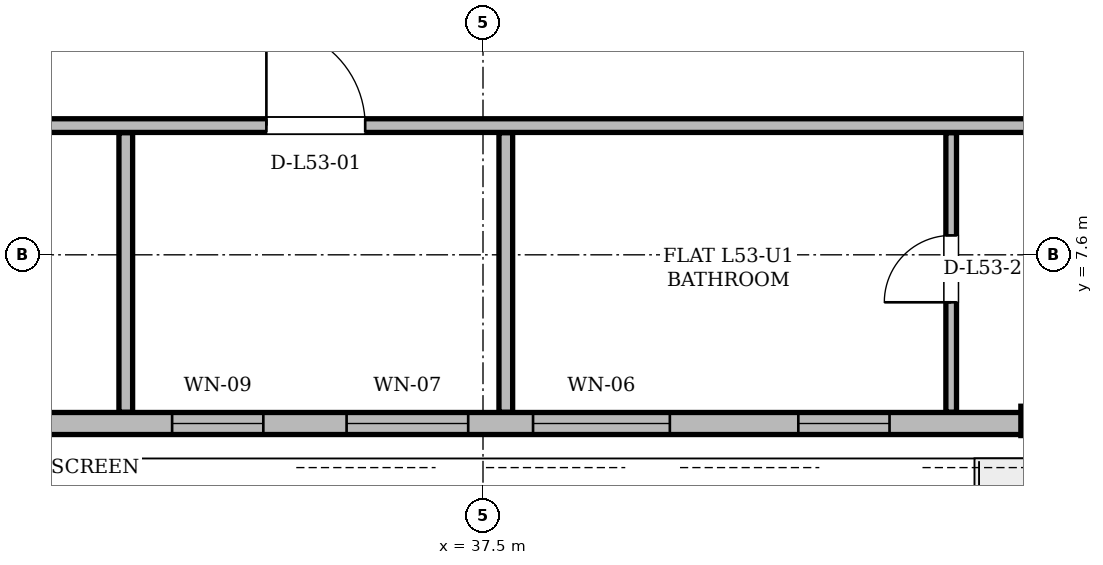
"""IFC4 building model, lengths in metres.
Left out: names, types, materials, properties, quantities, classifications, styles, units other than length and angle.
Written with IfcOpenShell. Run it as: python <this file> out.ifc"""

import sys

from ifc_helpers import new_model, si_unit, direction, frame, frame_2d, origin, origin_2d, place, context, subcontext, project, spatial, rectangle, i_section, extrude, element, fill, save


model = new_model("IFC4")
c1 = context("Model", 3, precision=1e-05, world=origin(), true_north=direction((0.0, 1.0)))
c2 = subcontext(c1, "Body", "Model", "MODEL_VIEW")
j1 = project(units=[si_unit("LENGTHUNIT", "METRE"), si_unit("PLANEANGLEUNIT", "RADIAN")], contexts=[c1])
p1 = place(None, origin())
s1 = spatial("IfcSite", under=j1, at=p1, CompositionType="ELEMENT")
p2 = place(p1, origin())
s2 = spatial("IfcBuilding", under=s1, at=p2, CompositionType="ELEMENT")
p3 = place(p2, frame((0.0, 0.0, 201.0)))
s3 = spatial("IfcBuildingStorey", under=s2, at=p3, CompositionType="ELEMENT", Elevation=201.0)
p4 = place(p3, frame((44.771, 5.381, 0.004), z_axis=(0.003194723364, 0.019100367347, 0.999812467271), x_axis=(-0.986298895816, 0.164968142717, 0.0)))
e1 = element("IfcColumn", 1, at=p4, inside=s3, PredefinedType="COLUMN", context=c2, shape_type="SweptSolid", body=[
    extrude(i_section(OverallWidth=0.399, OverallDepth=0.386, WebThickness=0.021, FlangeThickness=0.033, at=origin_2d()), origin(), (0.0, 0.0, 1.0), 3.592),
])
p5 = place(p3, frame((19.324, 5.381, 0.0), z_axis=(0.0, 0.0, 1.0), x_axis=(1.0, 0.0, 0.0)))
e2 = element("IfcWall", 2, at=p5, inside=s3, PredefinedType="SOLIDWALL", context=c2, shape_type="SweptSolid", body=[
    extrude(rectangle(XDim=36.352, YDim=0.29, at=frame_2d((18.176, 0.0))), origin(), (0.0, 0.0, 1.0), 2.677),
])
p6 = place(p5, frame((6.579, 0.0, 0.0)))
e3 = element("IfcOpeningElement", 3, at=p6, cuts=e2, PredefinedType="OPENING", context=c2, shape_type="SweptSolid", body=[
    extrude(rectangle(XDim=1.5, YDim=2.2, at=frame_2d((0.75, 1.1))), frame((0.0, 0.145, 0.0), z_axis=(0.0, -1.0, 0.0), x_axis=(1.0, 0.0, 0.0)), (0.0, 0.0, 1.0), 0.29),
])
p7 = place(p5, frame((26.817, 0.0, 0.0)))
e4 = element("IfcOpeningElement", 4, at=p7, cuts=e2, PredefinedType="OPENING", context=c2, shape_type="SweptSolid", body=[
    extrude(rectangle(XDim=1.5, YDim=2.2, at=frame_2d((0.75, 1.1))), frame((0.0, 0.145, 0.0), z_axis=(0.0, -1.0, 0.0), x_axis=(1.0, 0.0, 0.0)), (0.0, 0.0, 1.0), 0.29),
])
p8 = place(p5, frame((14.085, 0.0, 0.85)))
e5 = element("IfcOpeningElement", 5, at=p8, cuts=e2, PredefinedType="OPENING", context=c2, shape_type="SweptSolid", body=[
    extrude(rectangle(XDim=1.2, YDim=1.48, at=frame_2d((0.6, 0.74))), frame((0.0, 0.145, 0.0), z_axis=(0.0, -1.0, 0.0), x_axis=(1.0, 0.0, 0.0)), (0.0, 0.0, 1.0), 0.29),
])
p9 = place(p5, frame((16.381, 0.0, 0.85)))
e6 = element("IfcOpeningElement", 6, at=p9, cuts=e2, PredefinedType="OPENING", context=c2, shape_type="SweptSolid", body=[
    extrude(rectangle(XDim=1.6, YDim=1.7, at=frame_2d((0.8, 0.85))), frame((0.0, 0.145, 0.0), z_axis=(0.0, -1.0, 0.0), x_axis=(1.0, 0.0, 0.0)), (0.0, 0.0, 1.0), 0.29),
])
p10 = place(p5, frame((32.072, 0.0, 0.85)))
e7 = element("IfcOpeningElement", 7, at=p10, cuts=e2, PredefinedType="OPENING", context=c2, shape_type="SweptSolid", body=[
    extrude(rectangle(XDim=1.4, YDim=1.6, at=frame_2d((0.7, 0.8))), frame((0.0, 0.145, 0.0), z_axis=(0.0, -1.0, 0.0), x_axis=(1.0, 0.0, 0.0)), (0.0, 0.0, 1.0), 0.29),
])
p11 = place(p5, frame((18.834, 0.0, 0.85)))
e8 = element("IfcOpeningElement", 8, at=p11, cuts=e2, PredefinedType="OPENING", context=c2, shape_type="SweptSolid", body=[
    extrude(rectangle(XDim=1.8, YDim=1.717, at=frame_2d((0.9, 0.858))), frame((0.0, 0.145, 0.0), z_axis=(0.0, -1.0, 0.0), x_axis=(1.0, 0.0, 0.0)), (0.0, 0.0, 1.0), 0.29),
])
p12 = place(p5, frame((22.325, 0.0, 0.85)))
e9 = element("IfcOpeningElement", 9, at=p12, cuts=e2, PredefinedType="OPENING", context=c2, shape_type="SweptSolid", body=[
    extrude(rectangle(XDim=1.2, YDim=1.48, at=frame_2d((0.6, 0.74))), frame((0.0, 0.145, 0.0), z_axis=(0.0, -1.0, 0.0), x_axis=(1.0, 0.0, 0.0)), (0.0, 0.0, 1.0), 0.29),
])
p13 = place(p5, frame((3.145, 0.0, 0.85)))
e10 = element("IfcOpeningElement", 10, at=p13, cuts=e2, PredefinedType="OPENING", context=c2, shape_type="SweptSolid", body=[
    extrude(rectangle(XDim=1.6, YDim=1.7, at=frame_2d((0.8, 0.85))), frame((0.0, 0.145, 0.0), z_axis=(0.0, -1.0, 0.0), x_axis=(1.0, 0.0, 0.0)), (0.0, 0.0, 1.0), 0.29),
])
p14 = place(p5, frame((8.997, 0.0, 0.85)))
e11 = element("IfcOpeningElement", 11, at=p14, cuts=e2, PredefinedType="OPENING", context=c2, shape_type="SweptSolid", body=[
    extrude(rectangle(XDim=1.2, YDim=1.48, at=frame_2d((0.6, 0.74))), frame((0.0, 0.145, 0.0), z_axis=(0.0, -1.0, 0.0), x_axis=(1.0, 0.0, 0.0)), (0.0, 0.0, 1.0), 0.29),
])
p15 = place(p5, frame((0.53, 0.0, 0.85)))
e12 = element("IfcOpeningElement", 12, at=p15, cuts=e2, PredefinedType="OPENING", context=c2, shape_type="SweptSolid", body=[
    extrude(rectangle(XDim=0.7, YDim=1.2, at=frame_2d((0.35, 0.6))), frame((0.0, 0.145, 0.0), z_axis=(0.0, -1.0, 0.0), x_axis=(1.0, 0.0, 0.0)), (0.0, 0.0, 1.0), 0.29),
])
p16 = place(p3, frame((27.55, 9.3, 0.0), z_axis=(0.0, 0.0, 1.0), x_axis=(1.0, 0.0, 0.0)))
e13 = element("IfcWall", 13, at=p16, inside=s3, PredefinedType="PARTITIONING", context=c2, shape_type="SweptSolid", body=[
    extrude(rectangle(XDim=21.25, YDim=0.18, at=frame_2d((10.625, 0.0))), origin(), (0.0, 0.0, 1.0), 2.913),
])
p17 = place(p16, frame((7.1, 0.0, 0.0)))
e14 = element("IfcOpeningElement", 14, at=p17, cuts=e13, PredefinedType="OPENING", context=c2, shape_type="SweptSolid", body=[
    extrude(rectangle(XDim=1.3, YDim=2.2, at=frame_2d((0.65, 1.1))), frame((0.0, 0.09, 0.0), z_axis=(0.0, -1.0, 0.0), x_axis=(1.0, 0.0, 0.0)), (0.0, 0.0, 1.0), 0.18),
])
p18 = place(p16, frame((18.519, 0.0, 0.0)))
e15 = element("IfcOpeningElement", 15, at=p18, cuts=e13, PredefinedType="OPENING", context=c2, shape_type="SweptSolid", body=[
    extrude(rectangle(XDim=1.0, YDim=2.18, at=frame_2d((0.5, 1.09))), frame((0.0, 0.09, 0.0), z_axis=(0.0, -1.0, 0.0), x_axis=(1.0, 0.0, 0.0)), (0.0, 0.0, 1.0), 0.18),
])
p19 = place(p3, frame((32.8, 5.53, 0.0), z_axis=(0.0, 0.0, 1.0), x_axis=(0.0, 1.0, 0.0)))
e16 = element("IfcWall", 16, at=p19, inside=s3, PredefinedType="PARTITIONING", context=c2, shape_type="SweptSolid", body=[
    extrude(rectangle(XDim=3.676, YDim=0.18, at=frame_2d((1.838, 0.0))), origin(), (0.0, 0.0, 1.0), 2.966),
])
p20 = place(p3, frame((37.8, 5.53, 0.0), z_axis=(0.0, 0.0, 1.0), x_axis=(0.0, 1.0, 0.0)))
e17 = element("IfcWall", 17, at=p20, inside=s3, PredefinedType="PARTITIONING", context=c2, shape_type="SweptSolid", body=[
    extrude(rectangle(XDim=3.676, YDim=0.18, at=frame_2d((1.838, 0.0))), origin(), (0.0, 0.0, 1.0), 3.38),
])
p21 = place(p3, frame((43.66, 5.53, 0.0), z_axis=(0.0, 0.0, 1.0), x_axis=(0.0, 1.0, 0.0)))
e18 = element("IfcWall", 18, at=p21, inside=s3, PredefinedType="PARTITIONING", context=c2, shape_type="SweptSolid", body=[
    extrude(rectangle(XDim=3.676, YDim=0.14, at=frame_2d((1.838, 0.0))), origin(), (0.0, 0.0, 1.0), 3.38),
])
p22 = place(p21, frame((1.446, 0.0, 0.0)))
e19 = element("IfcOpeningElement", 19, at=p22, cuts=e18, PredefinedType="OPENING", context=c2, shape_type="SweptSolid", body=[
    extrude(rectangle(XDim=0.88, YDim=2.08, at=frame_2d((0.44, 1.04))), frame((0.0, 0.07, 0.0), z_axis=(0.0, -1.0, 0.0), x_axis=(1.0, 0.0, 0.0)), (0.0, 0.0, 1.0), 0.14),
])
p23 = place(p8, origin())
e20 = element("IfcWindow", 20, at=p23, inside=s3, PartitioningType="SINGLE_PANEL", PredefinedType="WINDOW", context=c2, shape_type="SweptSolid", body=[
    extrude(rectangle(XDim=1.2, YDim=1.48, at=frame_2d((0.6, 0.74))), frame((0.0, 0.03, 0.0), z_axis=(0.0, -1.0, 0.0), x_axis=(1.0, 0.0, 0.0)), (0.0, 0.0, 1.0), 0.06),
])
fill(e5, e20)
p24 = place(p9, origin())
e21 = element("IfcWindow", 21, at=p24, inside=s3, PartitioningType="SINGLE_PANEL", PredefinedType="WINDOW", context=c2, shape_type="SweptSolid", body=[
    extrude(rectangle(XDim=1.6, YDim=1.7, at=frame_2d((0.8, 0.85))), frame((0.0, 0.03, 0.0), z_axis=(0.0, -1.0, 0.0), x_axis=(1.0, 0.0, 0.0)), (0.0, 0.0, 1.0), 0.06),
])
fill(e6, e21)
p25 = place(p11, origin())
e22 = element("IfcWindow", 22, at=p25, inside=s3, PartitioningType="SINGLE_PANEL", PredefinedType="WINDOW", context=c2, shape_type="SweptSolid", body=[
    extrude(rectangle(XDim=1.8, YDim=1.717, at=frame_2d((0.9, 0.858))), frame((0.0, 0.03, 0.0), z_axis=(0.0, -1.0, 0.0), x_axis=(1.0, 0.0, 0.0)), (0.0, 0.0, 1.0), 0.06),
])
fill(e8, e22)
p26 = place(p12, origin())
e23 = element("IfcWindow", 23, at=p26, inside=s3, PartitioningType="SINGLE_PANEL", PredefinedType="WINDOW", context=c2, shape_type="SweptSolid", body=[
    extrude(rectangle(XDim=1.2, YDim=1.48, at=frame_2d((0.6, 0.74))), frame((0.0, 0.03, 0.0), z_axis=(0.0, -1.0, 0.0), x_axis=(1.0, 0.0, 0.0)), (0.0, 0.0, 1.0), 0.06),
])
fill(e9, e23)
p27 = place(p17, origin())
e24 = element("IfcDoor", 24, at=p27, inside=s3, OperationType="SINGLE_SWING_LEFT", PredefinedType="DOOR", context=c2, shape_type="SweptSolid", body=[
    extrude(rectangle(XDim=1.3, YDim=2.2, at=frame_2d((0.65, 1.1))), frame((0.0, 0.025, 0.0), z_axis=(0.0, -1.0, 0.0), x_axis=(1.0, 0.0, 0.0)), (0.0, 0.0, 1.0), 0.05),
])
fill(e14, e24)
p28 = place(p22, origin())
e25 = element("IfcDoor", 25, at=p28, inside=s3, OperationType="SINGLE_SWING_LEFT", PredefinedType="DOOR", context=c2, shape_type="SweptSolid", body=[
    extrude(rectangle(XDim=0.88, YDim=2.08, at=frame_2d((0.44, 1.04))), frame((0.0, 0.025, 0.0), z_axis=(0.0, -1.0, 0.0), x_axis=(1.0, 0.0, 0.0)), (0.0, 0.0, 1.0), 0.05),
])
fill(e19, e25)
save(model, sys.argv[1])
